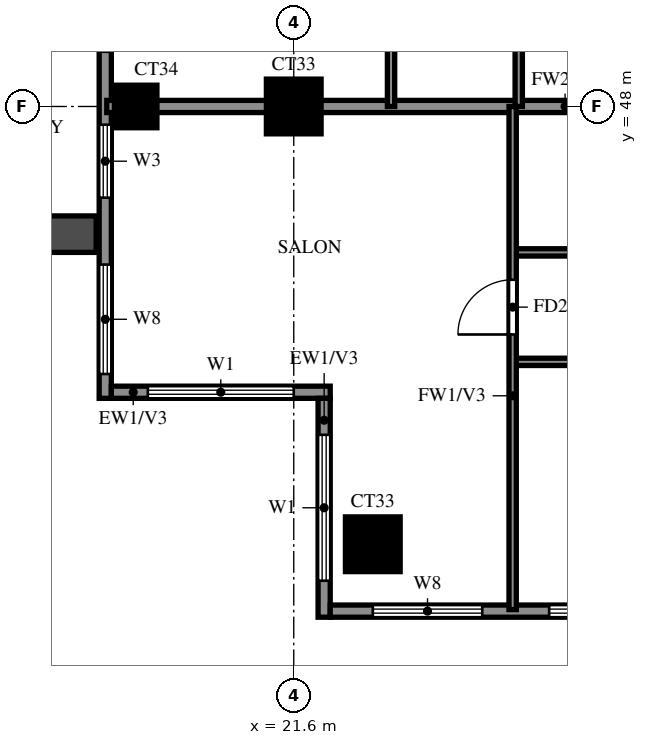
"""IFC4 building model, lengths in metres.
Left out: names, types, materials, properties, quantities, classifications, styles, units other than length and angle.
Written with IfcOpenShell. Run it as: python <this file> out.ifc"""

import sys

from ifc_helpers import new_model, si_unit, direction, frame, frame_2d, origin, origin_2d, place, context, subcontext, project, spatial, rectangle, extrude, source, transform, mapped, element, fill, save


model = new_model("IFC4")
c1 = context("Model", 3, precision=1e-05, world=origin(), true_north=direction((0.0, 1.0)))
c2 = subcontext(c1, "Body", "Model", "MODEL_VIEW")
j1 = project(units=[si_unit("LENGTHUNIT", "METRE"), si_unit("PLANEANGLEUNIT", "RADIAN")], contexts=[c1])
p1 = place(None, origin())
s1 = spatial("IfcSite", under=j1, at=p1, CompositionType="ELEMENT")
p2 = place(p1, origin())
s2 = spatial("IfcBuilding", under=s1, at=p2, CompositionType="ELEMENT")
p3 = place(p2, frame((0.0, 0.0, 229.0)))
s3 = spatial("IfcBuildingStorey", under=s2, at=p3, CompositionType="ELEMENT", Elevation=229.0)
m1 = source(origin(), c2, "Body", "SweptSolid", [
    extrude(rectangle(XDim=0.9, YDim=0.9, at=origin_2d()), origin(), (0.0, 0.0, 1.0), 3.22),
])
p4 = place(p3, frame((22.9, 40.8, 0.0), z_axis=(0.0, 0.0, 1.0), x_axis=(1.0, 0.0, 0.0)))
e1 = element("IfcColumn", 1, at=p4, inside=s3, PredefinedType="COLUMN", context=c2, shape_type="MappedRepresentation", body=[
    mapped(m1, transform((0.0, 0.0, 0.0))),
])
m2 = source(origin(), c2, "Body", "SweptSolid", [
    extrude(rectangle(XDim=0.7, YDim=0.7, at=origin_2d()), origin(), (0.0, 0.0, 1.0), 3.22),
])
p5 = place(p3, frame((19.0, 48.0, 0.0), z_axis=(0.0, 0.0, 1.0), x_axis=(1.0, 0.0, 0.0)))
e2 = element("IfcColumn", 2, at=p5, inside=s3, PredefinedType="COLUMN", context=c2, shape_type="MappedRepresentation", body=[
    mapped(m2, transform((0.0, 0.0, 0.0))),
])
p6 = place(p3, frame((21.6, 48.0, 0.0), z_axis=(0.0, 0.0, 1.0), x_axis=(1.0, 0.0, 0.0)))
e3 = element("IfcColumn", 3, at=p6, inside=s3, PredefinedType="COLUMN", context=c2, shape_type="MappedRepresentation", body=[
    mapped(m1, transform((0.0, 0.0, 0.0))),
])
p7 = place(p3, frame((18.5, 76.6, 0.0), z_axis=(0.0, 0.0, 1.0), x_axis=(0.0, -1.0, 0.0)))
e4 = element("IfcWall", 4, at=p7, inside=s3, PredefinedType="SOLIDWALL", context=c2, shape_type="SweptSolid", body=[
    extrude(rectangle(XDim=33.4, YDim=0.2, at=frame_2d((16.7, 0.0))), origin(), (0.0, 0.0, 1.0), 3.22),
])
p8 = place(p7, frame((11.5, 0.0, 0.0)))
e5 = element("IfcOpeningElement", 5, at=p8, cuts=e4, PredefinedType="OPENING", context=c2, shape_type="SweptSolid", body=[
    extrude(rectangle(XDim=1.8, YDim=2.4, at=frame_2d((0.9, 1.2))), frame((0.0, 0.11, 0.0), z_axis=(0.0, -1.0, 0.0), x_axis=(1.0, 0.0, 0.0)), (0.0, 0.0, 1.0), 0.22),
])
p9 = place(p7, frame((25.9, 0.0, 0.0)))
e6 = element("IfcOpeningElement", 6, at=p9, cuts=e4, PredefinedType="OPENING", context=c2, shape_type="SweptSolid", body=[
    extrude(rectangle(XDim=1.8, YDim=2.4, at=frame_2d((0.9, 1.2))), frame((0.0, 0.11, 0.0), z_axis=(0.0, -1.0, 0.0), x_axis=(1.0, 0.0, 0.0)), (0.0, 0.0, 1.0), 0.22),
])
p10 = place(p7, frame((28.9, 0.0, 0.6)))
e7 = element("IfcOpeningElement", 7, at=p10, cuts=e4, PredefinedType="OPENING", context=c2, shape_type="SweptSolid", body=[
    extrude(rectangle(XDim=1.2, YDim=2.4, at=frame_2d((0.6, 1.2))), frame((0.0, 0.11, 0.0), z_axis=(0.0, -1.0, 0.0), x_axis=(1.0, 0.0, 0.0)), (0.0, 0.0, 1.0), 0.22),
])
p11 = place(p7, frame((31.2, 0.0, 0.6)))
e8 = element("IfcOpeningElement", 8, at=p11, cuts=e4, PredefinedType="OPENING", context=c2, shape_type="SweptSolid", body=[
    extrude(rectangle(XDim=1.8, YDim=2.4, at=frame_2d((0.9, 1.2))), frame((0.0, 0.11, 0.0), z_axis=(0.0, -1.0, 0.0), x_axis=(1.0, 0.0, 0.0)), (0.0, 0.0, 1.0), 0.22),
])
p12 = place(p7, frame((21.7, 0.0, 0.6)))
e9 = element("IfcOpeningElement", 9, at=p12, cuts=e4, PredefinedType="OPENING", context=c2, shape_type="SweptSolid", body=[
    extrude(rectangle(XDim=1.8, YDim=2.4, at=frame_2d((0.9, 1.2))), frame((0.0, 0.11, 0.0), z_axis=(0.0, -1.0, 0.0), x_axis=(1.0, 0.0, 0.0)), (0.0, 0.0, 1.0), 0.22),
])
p13 = place(p7, frame((14.5, 0.0, 0.6)))
e10 = element("IfcOpeningElement", 10, at=p13, cuts=e4, PredefinedType="OPENING", context=c2, shape_type="SweptSolid", body=[
    extrude(rectangle(XDim=1.2, YDim=2.4, at=frame_2d((0.6, 1.2))), frame((0.0, 0.11, 0.0), z_axis=(0.0, -1.0, 0.0), x_axis=(1.0, 0.0, 0.0)), (0.0, 0.0, 1.0), 0.22),
])
p14 = place(p7, frame((17.8, 0.0, 0.6)))
e11 = element("IfcOpeningElement", 11, at=p14, cuts=e4, PredefinedType="OPENING", context=c2, shape_type="SweptSolid", body=[
    extrude(rectangle(XDim=2.4, YDim=2.4, at=frame_2d((1.2, 1.2))), frame((0.0, 0.11, 0.0), z_axis=(0.0, -1.0, 0.0), x_axis=(1.0, 0.0, 0.0)), (0.0, 0.0, 1.0), 0.22),
])
p15 = place(p7, frame((7.3, 0.0, 0.6)))
e12 = element("IfcOpeningElement", 12, at=p15, cuts=e4, PredefinedType="OPENING", context=c2, shape_type="SweptSolid", body=[
    extrude(rectangle(XDim=1.8, YDim=2.4, at=frame_2d((0.9, 1.2))), frame((0.0, 0.11, 0.0), z_axis=(0.0, -1.0, 0.0), x_axis=(1.0, 0.0, 0.0)), (0.0, 0.0, 1.0), 0.22),
])
p16 = place(p7, frame((4.0, 0.0, 0.6)))
e13 = element("IfcOpeningElement", 13, at=p16, cuts=e4, PredefinedType="OPENING", context=c2, shape_type="SweptSolid", body=[
    extrude(rectangle(XDim=2.4, YDim=2.4, at=frame_2d((1.2, 1.2))), frame((0.0, 0.11, 0.0), z_axis=(0.0, -1.0, 0.0), x_axis=(1.0, 0.0, 0.0)), (0.0, 0.0, 1.0), 0.22),
])
p17 = place(p7, frame((0.6, 0.0, 0.6)))
e14 = element("IfcOpeningElement", 14, at=p17, cuts=e4, PredefinedType="OPENING", context=c2, shape_type="SweptSolid", body=[
    extrude(rectangle(XDim=2.4, YDim=2.4, at=frame_2d((1.2, 1.2))), frame((0.0, 0.11, 0.0), z_axis=(0.0, -1.0, 0.0), x_axis=(1.0, 0.0, 0.0)), (0.0, 0.0, 1.0), 0.22),
])
p18 = place(p3, frame((18.6, 43.3, 0.0), z_axis=(0.0, 0.0, 1.0), x_axis=(1.0, 0.0, 0.0)))
e15 = element("IfcWall", 15, at=p18, inside=s3, PredefinedType="SOLIDWALL", context=c2, shape_type="SweptSolid", body=[
    extrude(rectangle(XDim=3.6, YDim=0.2, at=frame_2d((1.8, 0.0))), origin(), (0.0, 0.0, 1.0), 3.22),
])
p19 = place(p18, frame((0.6, 0.0, 0.6)))
e16 = element("IfcOpeningElement", 16, at=p19, cuts=e15, PredefinedType="OPENING", context=c2, shape_type="SweptSolid", body=[
    extrude(rectangle(XDim=2.4, YDim=2.4, at=frame_2d((1.2, 1.2))), frame((0.0, 0.11, 0.0), z_axis=(0.0, -1.0, 0.0), x_axis=(1.0, 0.0, 0.0)), (0.0, 0.0, 1.0), 0.22),
])
p20 = place(p3, frame((22.1, 43.2, 0.0), z_axis=(0.0, 0.0, 1.0), x_axis=(0.0, -1.0, 0.0)))
e17 = element("IfcWall", 17, at=p20, inside=s3, PredefinedType="SOLIDWALL", context=c2, shape_type="SweptSolid", body=[
    extrude(rectangle(XDim=3.6, YDim=0.2, at=frame_2d((1.8, 0.0))), origin(), (0.0, 0.0, 1.0), 3.22),
])
p21 = place(p20, frame((0.6, 0.0, 0.6)))
e18 = element("IfcOpeningElement", 18, at=p21, cuts=e17, PredefinedType="OPENING", context=c2, shape_type="SweptSolid", body=[
    extrude(rectangle(XDim=2.4, YDim=2.4, at=frame_2d((1.2, 1.2))), frame((0.0, 0.11, 0.0), z_axis=(0.0, -1.0, 0.0), x_axis=(1.0, 0.0, 0.0)), (0.0, 0.0, 1.0), 0.22),
])
p22 = place(p3, frame((22.2, 39.7, 0.0), z_axis=(0.0, 0.0, 1.0), x_axis=(1.0, 0.0, 0.0)))
e19 = element("IfcWall", 19, at=p22, inside=s3, PredefinedType="SOLIDWALL", context=c2, shape_type="SweptSolid", body=[
    extrude(rectangle(XDim=19.8, YDim=0.2, at=frame_2d((9.9, 0.0))), origin(), (0.0, 0.0, 1.0), 3.22),
])
p23 = place(p22, frame((0.7, 0.0, 0.6)))
e20 = element("IfcOpeningElement", 20, at=p23, cuts=e19, PredefinedType="OPENING", context=c2, shape_type="SweptSolid", body=[
    extrude(rectangle(XDim=1.8, YDim=2.4, at=frame_2d((0.9, 1.2))), frame((0.0, 0.11, 0.0), z_axis=(0.0, -1.0, 0.0), x_axis=(1.0, 0.0, 0.0)), (0.0, 0.0, 1.0), 0.22),
])
p24 = place(p22, frame((3.6, 0.0, 0.6)))
e21 = element("IfcOpeningElement", 21, at=p24, cuts=e19, PredefinedType="OPENING", context=c2, shape_type="SweptSolid", body=[
    extrude(rectangle(XDim=2.4, YDim=2.4, at=frame_2d((1.2, 1.2))), frame((0.0, 0.11, 0.0), z_axis=(0.0, -1.0, 0.0), x_axis=(1.0, 0.0, 0.0)), (0.0, 0.0, 1.0), 0.22),
])
p25 = place(p22, frame((7.8, 0.0, 0.6)))
e22 = element("IfcOpeningElement", 22, at=p25, cuts=e19, PredefinedType="OPENING", context=c2, shape_type="SweptSolid", body=[
    extrude(rectangle(XDim=2.4, YDim=2.4, at=frame_2d((1.2, 1.2))), frame((0.0, 0.11, 0.0), z_axis=(0.0, -1.0, 0.0), x_axis=(1.0, 0.0, 0.0)), (0.0, 0.0, 1.0), 0.22),
])
p26 = place(p3, frame((18.35, 45.9, 0.0), z_axis=(0.0, 0.0, 1.0), x_axis=(-1.0, 0.0, 0.0)))
e23 = element("IfcWall", 23, at=p26, inside=s3, PredefinedType="SOLIDWALL", context=c2, shape_type="SweptSolid", body=[
    extrude(rectangle(XDim=2.65, YDim=0.6, at=frame_2d((1.325, 0.0))), origin(), (0.0, 0.0, 1.0), 2.85),
])
p27 = place(p3, frame((18.525, 48.0, 0.0), z_axis=(0.0, 0.0, 1.0), x_axis=(1.0, 0.0, 0.0)))
e24 = element("IfcWall", 24, at=p27, inside=s3, PredefinedType="SOLIDWALL", context=c2, shape_type="SweptSolid", body=[
    extrude(rectangle(XDim=15.075, YDim=0.2, at=frame_2d((7.538, 0.0))), origin(), (0.0, 0.0, 1.0), 3.22),
])
p28 = place(p3, frame((25.2, 43.8, 0.0), z_axis=(0.0, 0.0, 1.0), x_axis=(1.0, 0.0, 0.0)))
e25 = element("IfcWall", 25, at=p28, inside=s3, PredefinedType="PARTITIONING", context=c2, shape_type="SweptSolid", body=[
    extrude(rectangle(XDim=8.4, YDim=0.12, at=frame_2d((4.2, 0.0))), origin(), (0.0, 0.0, 1.0), 3.22),
])
p29 = place(p28, frame((1.35, 0.0, 0.0)))
e26 = element("IfcOpeningElement", 26, at=p29, cuts=e25, PredefinedType="OPENING", context=c2, shape_type="SweptSolid", body=[
    extrude(rectangle(XDim=0.9, YDim=2.1, at=frame_2d((0.45, 1.05))), frame((0.0, 0.07, 0.0), z_axis=(0.0, -1.0, 0.0), x_axis=(1.0, 0.0, 0.0)), (0.0, 0.0, 1.0), 0.14),
])
p30 = place(p28, frame((5.55, 0.0, 0.0)))
e27 = element("IfcOpeningElement", 27, at=p30, cuts=e25, PredefinedType="OPENING", context=c2, shape_type="SweptSolid", body=[
    extrude(rectangle(XDim=0.9, YDim=2.1, at=frame_2d((0.45, 1.05))), frame((0.0, 0.07, 0.0), z_axis=(0.0, -1.0, 0.0), x_axis=(1.0, 0.0, 0.0)), (0.0, 0.0, 1.0), 0.14),
])
p31 = place(p3, frame((25.2, 45.6, 0.0), z_axis=(0.0, 0.0, 1.0), x_axis=(1.0, 0.0, 0.0)))
e28 = element("IfcWall", 28, at=p31, inside=s3, PredefinedType="PARTITIONING", context=c2, shape_type="SweptSolid", body=[
    extrude(rectangle(XDim=6.0, YDim=0.12, at=frame_2d((3.0, 0.0))), origin(), (0.0, 0.0, 1.0), 3.22),
])
p32 = place(p31, frame((1.425, 0.0, 0.0)))
e29 = element("IfcOpeningElement", 29, at=p32, cuts=e28, PredefinedType="OPENING", context=c2, shape_type="SweptSolid", body=[
    extrude(rectangle(XDim=0.9, YDim=2.1, at=frame_2d((0.45, 1.05))), frame((0.0, 0.07, 0.0), z_axis=(0.0, -1.0, 0.0), x_axis=(1.0, 0.0, 0.0)), (0.0, 0.0, 1.0), 0.14),
])
p33 = place(p3, frame((23.2, 48.0, 0.0), z_axis=(0.0, 0.0, 1.0), x_axis=(0.0, 1.0, 0.0)))
e30 = element("IfcWall", 30, at=p33, inside=s3, PredefinedType="PARTITIONING", context=c2, shape_type="SweptSolid", body=[
    extrude(rectangle(XDim=25.2, YDim=0.12, at=frame_2d((12.6, 0.0))), origin(), (0.0, 0.0, 1.0), 3.22),
])
p34 = place(p33, frame((1.35, 0.0, 0.0)))
e31 = element("IfcOpeningElement", 31, at=p34, cuts=e30, PredefinedType="OPENING", context=c2, shape_type="SweptSolid", body=[
    extrude(rectangle(XDim=0.9, YDim=2.1, at=frame_2d((0.45, 1.05))), frame((0.0, 0.07, 0.0), z_axis=(0.0, -1.0, 0.0), x_axis=(1.0, 0.0, 0.0)), (0.0, 0.0, 1.0), 0.14),
])
p35 = place(p33, frame((4.95, 0.0, 0.0)))
e32 = element("IfcOpeningElement", 32, at=p35, cuts=e30, PredefinedType="OPENING", context=c2, shape_type="SweptSolid", body=[
    extrude(rectangle(XDim=0.9, YDim=2.1, at=frame_2d((0.45, 1.05))), frame((0.0, 0.07, 0.0), z_axis=(0.0, -1.0, 0.0), x_axis=(1.0, 0.0, 0.0)), (0.0, 0.0, 1.0), 0.14),
])
p36 = place(p33, frame((10.05, 0.0, 0.0)))
e33 = element("IfcOpeningElement", 33, at=p36, cuts=e30, PredefinedType="OPENING", context=c2, shape_type="SweptSolid", body=[
    extrude(rectangle(XDim=1.5, YDim=2.1, at=frame_2d((0.75, 1.05))), frame((0.0, 0.07, 0.0), z_axis=(0.0, -1.0, 0.0), x_axis=(1.0, 0.0, 0.0)), (0.0, 0.0, 1.0), 0.14),
])
p37 = place(p33, frame((15.75, 0.0, 0.0)))
e34 = element("IfcOpeningElement", 34, at=p37, cuts=e30, PredefinedType="OPENING", context=c2, shape_type="SweptSolid", body=[
    extrude(rectangle(XDim=0.9, YDim=2.1, at=frame_2d((0.45, 1.05))), frame((0.0, 0.07, 0.0), z_axis=(0.0, -1.0, 0.0), x_axis=(1.0, 0.0, 0.0)), (0.0, 0.0, 1.0), 0.14),
])
p38 = place(p33, frame((19.35, 0.0, 0.0)))
e35 = element("IfcOpeningElement", 35, at=p38, cuts=e30, PredefinedType="OPENING", context=c2, shape_type="SweptSolid", body=[
    extrude(rectangle(XDim=0.9, YDim=2.1, at=frame_2d((0.45, 1.05))), frame((0.0, 0.07, 0.0), z_axis=(0.0, -1.0, 0.0), x_axis=(1.0, 0.0, 0.0)), (0.0, 0.0, 1.0), 0.14),
])
p39 = place(p33, frame((22.95, 0.0, 0.0)))
e36 = element("IfcOpeningElement", 36, at=p39, cuts=e30, PredefinedType="OPENING", context=c2, shape_type="SweptSolid", body=[
    extrude(rectangle(XDim=0.9, YDim=2.1, at=frame_2d((0.45, 1.05))), frame((0.0, 0.07, 0.0), z_axis=(0.0, -1.0, 0.0), x_axis=(1.0, 0.0, 0.0)), (0.0, 0.0, 1.0), 0.14),
])
p40 = place(p3, frame((25.2, 39.725, 0.0), z_axis=(0.0, 0.0, 1.0), x_axis=(0.0, 1.0, 0.0)))
e37 = element("IfcWall", 37, at=p40, inside=s3, PredefinedType="PARTITIONING", context=c2, shape_type="SweptSolid", body=[
    extrude(rectangle(XDim=8.275, YDim=0.12, at=frame_2d((4.137, 0.0))), origin(), (0.0, 0.0, 1.0), 3.22),
])
p41 = place(p40, frame((4.525, 0.0, 0.0)))
e38 = element("IfcOpeningElement", 38, at=p41, cuts=e37, PredefinedType="OPENING", context=c2, shape_type="SweptSolid", body=[
    extrude(rectangle(XDim=0.9, YDim=2.1, at=frame_2d((0.45, 1.05))), frame((0.0, 0.07, 0.0), z_axis=(0.0, -1.0, 0.0), x_axis=(1.0, 0.0, 0.0)), (0.0, 0.0, 1.0), 0.14),
])
p42 = place(p3, frame((25.3, 48.0, 0.0), z_axis=(0.0, 0.0, 1.0), x_axis=(0.0, 1.0, 0.0)))
e39 = element("IfcWall", 39, at=p42, inside=s3, PredefinedType="PARTITIONING", context=c2, shape_type="SweptSolid", body=[
    extrude(rectangle(XDim=7.2, YDim=0.12, at=frame_2d((3.6, 0.0))), origin(), (0.0, 0.0, 1.0), 3.22),
])
p43 = place(p42, frame((1.975, 0.0, 0.0)))
e40 = element("IfcOpeningElement", 40, at=p43, cuts=e39, PredefinedType="OPENING", context=c2, shape_type="SweptSolid", body=[
    extrude(rectangle(XDim=0.9, YDim=2.1, at=frame_2d((0.45, 1.05))), frame((0.0, 0.07, 0.0), z_axis=(0.0, -1.0, 0.0), x_axis=(1.0, 0.0, 0.0)), (0.0, 0.0, 1.0), 0.14),
])
p44 = place(p10, origin())
e41 = element("IfcWindow", 41, at=p44, inside=s3, PartitioningType="SINGLE_PANEL", PredefinedType="WINDOW", context=c2, shape_type="SweptSolid", body=[
    extrude(rectangle(XDim=1.2, YDim=2.4, at=frame_2d((0.6, 1.2))), frame((0.0, 0.03, 0.0), z_axis=(0.0, -1.0, 0.0), x_axis=(1.0, 0.0, 0.0)), (0.0, 0.0, 1.0), 0.06),
])
fill(e7, e41)
p45 = place(p11, origin())
e42 = element("IfcWindow", 42, at=p45, inside=s3, PartitioningType="DOUBLE_PANEL_VERTICAL", PredefinedType="WINDOW", context=c2, shape_type="SweptSolid", body=[
    extrude(rectangle(XDim=1.8, YDim=2.4, at=frame_2d((0.9, 1.2))), frame((0.0, 0.03, 0.0), z_axis=(0.0, -1.0, 0.0), x_axis=(1.0, 0.0, 0.0)), (0.0, 0.0, 1.0), 0.06),
])
fill(e8, e42)
p46 = place(p19, origin())
e43 = element("IfcWindow", 43, at=p46, inside=s3, PartitioningType="DOUBLE_PANEL_VERTICAL", PredefinedType="WINDOW", context=c2, shape_type="SweptSolid", body=[
    extrude(rectangle(XDim=2.4, YDim=2.4, at=frame_2d((1.2, 1.2))), frame((0.0, 0.03, 0.0), z_axis=(0.0, -1.0, 0.0), x_axis=(1.0, 0.0, 0.0)), (0.0, 0.0, 1.0), 0.06),
])
fill(e16, e43)
p47 = place(p21, origin())
e44 = element("IfcWindow", 44, at=p47, inside=s3, PartitioningType="DOUBLE_PANEL_VERTICAL", PredefinedType="WINDOW", context=c2, shape_type="SweptSolid", body=[
    extrude(rectangle(XDim=2.4, YDim=2.4, at=frame_2d((1.2, 1.2))), frame((0.0, 0.03, 0.0), z_axis=(0.0, -1.0, 0.0), x_axis=(1.0, 0.0, 0.0)), (0.0, 0.0, 1.0), 0.06),
])
fill(e18, e44)
p48 = place(p23, origin())
e45 = element("IfcWindow", 45, at=p48, inside=s3, PartitioningType="DOUBLE_PANEL_VERTICAL", PredefinedType="WINDOW", context=c2, shape_type="SweptSolid", body=[
    extrude(rectangle(XDim=1.8, YDim=2.4, at=frame_2d((0.9, 1.2))), frame((0.0, 0.03, 0.0), z_axis=(0.0, -1.0, 0.0), x_axis=(1.0, 0.0, 0.0)), (0.0, 0.0, 1.0), 0.06),
])
fill(e20, e45)
p49 = place(p24, origin())
e46 = element("IfcWindow", 46, at=p49, inside=s3, PartitioningType="DOUBLE_PANEL_VERTICAL", PredefinedType="WINDOW", context=c2, shape_type="SweptSolid", body=[
    extrude(rectangle(XDim=2.4, YDim=2.4, at=frame_2d((1.2, 1.2))), frame((0.0, 0.03, 0.0), z_axis=(0.0, -1.0, 0.0), x_axis=(1.0, 0.0, 0.0)), (0.0, 0.0, 1.0), 0.06),
])
fill(e21, e46)
p50 = place(p41, origin())
e47 = element("IfcDoor", 47, at=p50, inside=s3, OperationType="SINGLE_SWING_LEFT", PredefinedType="DOOR", context=c2, shape_type="SweptSolid", body=[
    extrude(rectangle(XDim=0.9, YDim=2.1, at=frame_2d((0.45, 1.05))), frame((0.0, 0.025, 0.0), z_axis=(0.0, -1.0, 0.0), x_axis=(1.0, 0.0, 0.0)), (0.0, 0.0, 1.0), 0.05),
])
fill(e38, e47)
save(model, sys.argv[1])
